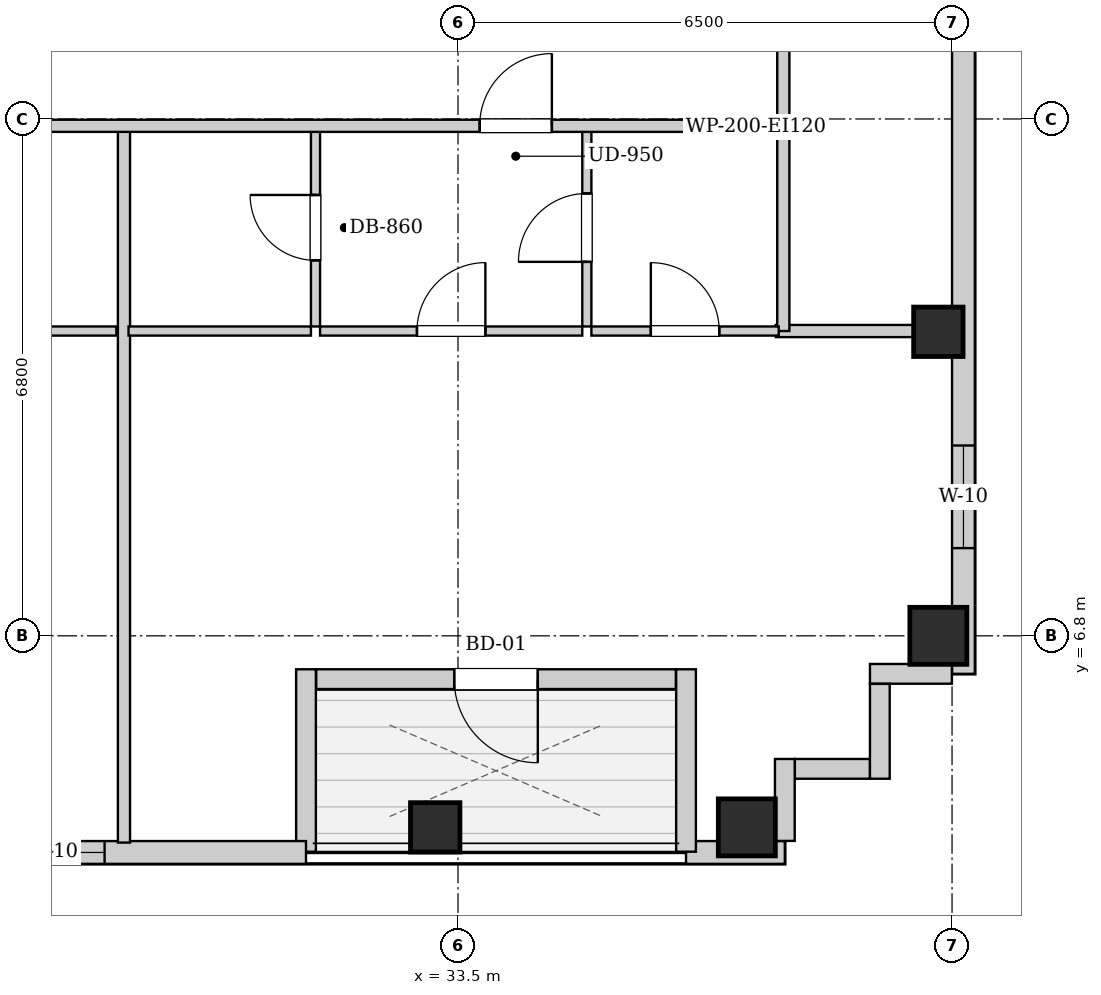
"""IFC4 building model, lengths in metres.
Left out: names, types, materials, properties, quantities, classifications, styles, units other than length and angle.
Written with IfcOpenShell. Run it as: python <this file> out.ifc"""

import sys

from ifc_helpers import new_model, si_unit, direction, frame, frame_2d, origin, origin_2d, place, context, subcontext, project, spatial, rectangle, extrude, element, fill, save


model = new_model("IFC4")
c1 = context("Model", 3, precision=1e-05, world=origin(), true_north=direction((0.0, 1.0)))
c2 = subcontext(c1, "Body", "Model", "MODEL_VIEW")
j1 = project(units=[si_unit("LENGTHUNIT", "METRE"), si_unit("PLANEANGLEUNIT", "RADIAN")], contexts=[c1])
p1 = place(None, origin())
s1 = spatial("IfcSite", under=j1, at=p1, CompositionType="ELEMENT")
p2 = place(p1, origin())
s2 = spatial("IfcBuilding", under=s1, at=p2, CompositionType="ELEMENT")
p3 = place(p2, frame((0.0, 0.0, 210.7)))
s3 = spatial("IfcBuildingStorey", under=s2, at=p3, CompositionType="ELEMENT", Elevation=210.7)
p4 = place(p3, frame((33.2, 4.28, 0.0), z_axis=(0.0, 0.0, 1.0), x_axis=(1.0, 0.0, 0.0)))
e1 = element("IfcColumn", 1, at=p4, inside=s3, PredefinedType="COLUMN", context=c2, shape_type="SweptSolid", body=[
    extrude(rectangle(XDim=0.65, YDim=0.65, at=origin_2d()), origin(), (0.0, 0.0, 1.0), 3.3),
])
for number, where, z_axis, x_axis in (
    (2, (37.3, 4.28, 0.0), (0.0, 0.0, 1.0), (1.0, 0.0, 0.0)),
    (3, (39.82, 6.8, 0.0), (0.0, 0.0, 1.0), (1.0, 0.0, 0.0)),
):
    element("IfcColumn", number, at=place(p3, frame(where, z_axis=z_axis, x_axis=x_axis)), inside=s3, PredefinedType="COLUMN", context=c2, shape_type="SweptSolid", body=[
        extrude(rectangle(XDim=0.75, YDim=0.75, at=origin_2d()), origin(), (0.0, 0.0, 1.0), 3.3),
    ])
p5 = place(p3, frame((39.82, 10.8, 0.0), z_axis=(0.0, 0.0, 1.0), x_axis=(1.0, 0.0, 0.0)))
e4 = element("IfcColumn", 4, at=p5, inside=s3, PredefinedType="COLUMN", context=c2, shape_type="SweptSolid", body=[
    extrude(rectangle(XDim=0.65, YDim=0.65, at=origin_2d()), origin(), (0.0, 0.0, 1.0), 3.3),
])
p6 = place(p3, frame((40.15, 37.7, 0.0), z_axis=(0.0, 0.0, 1.0), x_axis=(0.0, -1.0, 0.0)))
e5 = element("IfcWall", 5, at=p6, inside=s3, PredefinedType="SOLIDWALL", context=c2, shape_type="SweptSolid", body=[
    extrude(rectangle(XDim=31.4, YDim=0.3, at=frame_2d((15.7, 0.0))), origin(), (0.0, 0.0, 1.0), 3.04),
])
p7 = place(p6, frame((28.396, 0.0, 0.55)))
e6 = element("IfcOpeningElement", 6, at=p7, cuts=e5, PredefinedType="OPENING", context=c2, shape_type="SweptSolid", body=[
    extrude(rectangle(XDim=1.35, YDim=1.2, at=frame_2d((0.675, 0.6))), frame((0.0, 0.16, 0.0), z_axis=(0.0, -1.0, 0.0), x_axis=(1.0, 0.0, 0.0)), (0.0, 0.0, 1.0), 0.32),
])
p8 = place(p6, frame((1.653, 0.0, 0.55)))
e7 = element("IfcOpeningElement", 7, at=p8, cuts=e5, PredefinedType="OPENING", context=c2, shape_type="SweptSolid", body=[
    extrude(rectangle(XDim=1.35, YDim=1.2, at=frame_2d((0.675, 0.6))), frame((0.0, 0.16, 0.0), z_axis=(0.0, -1.0, 0.0), x_axis=(1.0, 0.0, 0.0)), (0.0, 0.0, 1.0), 0.32),
])
p9 = place(p6, frame((18.856, 0.0, 0.55)))
e8 = element("IfcOpeningElement", 8, at=p9, cuts=e5, PredefinedType="OPENING", context=c2, shape_type="SweptSolid", body=[
    extrude(rectangle(XDim=1.35, YDim=1.2, at=frame_2d((0.675, 0.6))), frame((0.0, 0.16, 0.0), z_axis=(0.0, -1.0, 0.0), x_axis=(1.0, 0.0, 0.0)), (0.0, 0.0, 1.0), 0.32),
])
p10 = place(p6, frame((20.466, 0.0, 0.55)))
e9 = element("IfcOpeningElement", 9, at=p10, cuts=e5, PredefinedType="OPENING", context=c2, shape_type="SweptSolid", body=[
    extrude(rectangle(XDim=1.35, YDim=1.2, at=frame_2d((0.675, 0.6))), frame((0.0, 0.16, 0.0), z_axis=(0.0, -1.0, 0.0), x_axis=(1.0, 0.0, 0.0)), (0.0, 0.0, 1.0), 0.32),
])
p11 = place(p6, frame((11.85, 0.0, 0.55)))
e10 = element("IfcOpeningElement", 10, at=p11, cuts=e5, PredefinedType="OPENING", context=c2, shape_type="SweptSolid", body=[
    extrude(rectangle(XDim=1.35, YDim=1.2, at=frame_2d((0.675, 0.6))), frame((0.0, 0.16, 0.0), z_axis=(0.0, -1.0, 0.0), x_axis=(1.0, 0.0, 0.0)), (0.0, 0.0, 1.0), 0.32),
])
p12 = place(p6, frame((9.185, 0.0, 0.55)))
e11 = element("IfcOpeningElement", 11, at=p12, cuts=e5, PredefinedType="OPENING", context=c2, shape_type="SweptSolid", body=[
    extrude(rectangle(XDim=1.35, YDim=1.2, at=frame_2d((0.675, 0.6))), frame((0.0, 0.16, 0.0), z_axis=(0.0, -1.0, 0.0), x_axis=(1.0, 0.0, 0.0)), (0.0, 0.0, 1.0), 0.32),
])
p13 = place(p3, frame((37.8, 3.95, 0.0), z_axis=(0.0, 0.0, 1.0), x_axis=(-1.0, 0.0, 0.0)))
e12 = element("IfcWall", 12, at=p13, inside=s3, PredefinedType="SOLIDWALL", context=c2, shape_type="SweptSolid", body=[
    extrude(rectangle(XDim=1.3, YDim=0.3, at=frame_2d((0.65, 0.0))), origin(), (0.0, 0.0, 1.0), 3.04),
])
p14 = place(p3, frame((36.5, 3.96, 0.0), z_axis=(0.0, 0.0, 1.0), x_axis=(0.0, 1.0, 0.0)))
e13 = element("IfcWall", 13, at=p14, inside=s3, PredefinedType="SOLIDWALL", context=c2, shape_type="SweptSolid", body=[
    extrude(rectangle(XDim=2.4, YDim=0.26, at=frame_2d((1.2, 0.0))), origin(), (0.0, 0.0, 1.0), 3.04),
])
p15 = place(p3, frame((36.366, 6.23, 0.0), z_axis=(0.0, 0.0, 1.0), x_axis=(-1.0, 0.0, 0.0)))
e14 = element("IfcWall", 14, at=p15, inside=s3, PredefinedType="SOLIDWALL", context=c2, shape_type="SweptSolid", body=[
    extrude(rectangle(XDim=4.732, YDim=0.26, at=frame_2d((2.366, 0.0))), origin(), (0.0, 0.0, 1.0), 3.04),
])
p16 = place(p15, frame((1.816, 0.0, 0.0)))
e15 = element("IfcOpeningElement", 15, at=p16, cuts=e14, PredefinedType="OPENING", context=c2, shape_type="SweptSolid", body=[
    extrude(rectangle(XDim=1.1, YDim=2.0, at=frame_2d((0.55, 1.0))), frame((0.0, 0.14, 0.0), z_axis=(0.0, -1.0, 0.0), x_axis=(1.0, 0.0, 0.0)), (0.0, 0.0, 1.0), 0.28),
])
p17 = place(p3, frame((31.5, 6.36, 0.0), z_axis=(0.0, 0.0, 1.0), x_axis=(0.0, -1.0, 0.0)))
e16 = element("IfcWall", 16, at=p17, inside=s3, PredefinedType="SOLIDWALL", context=c2, shape_type="SweptSolid", body=[
    extrude(rectangle(XDim=2.4, YDim=0.26, at=frame_2d((1.2, 0.0))), origin(), (0.0, 0.0, 1.0), 3.04),
])
p18 = place(p3, frame((31.5, 3.95, 0.0), z_axis=(0.0, 0.0, 1.0), x_axis=(-1.0, 0.0, 0.0)))
e17 = element("IfcWall", 17, at=p18, inside=s3, PredefinedType="SOLIDWALL", context=c2, shape_type="SweptSolid", body=[
    extrude(rectangle(XDim=10.65, YDim=0.3, at=frame_2d((5.325, 0.0))), origin(), (0.0, 0.0, 1.0), 3.04),
])
p19 = place(p18, frame((9.0, 0.0, 0.55)))
e18 = element("IfcOpeningElement", 18, at=p19, cuts=e17, PredefinedType="OPENING", context=c2, shape_type="SweptSolid", body=[
    extrude(rectangle(XDim=0.85, YDim=1.2, at=frame_2d((0.425, 0.6))), frame((0.0, 0.16, 0.0), z_axis=(0.0, -1.0, 0.0), x_axis=(1.0, 0.0, 0.0)), (0.0, 0.0, 1.0), 0.32),
])
p20 = place(p18, frame((2.65, 0.0, 0.55)))
e19 = element("IfcOpeningElement", 19, at=p20, cuts=e17, PredefinedType="OPENING", context=c2, shape_type="SweptSolid", body=[
    extrude(rectangle(XDim=1.35, YDim=1.2, at=frame_2d((0.675, 0.6))), frame((0.0, 0.16, 0.0), z_axis=(0.0, -1.0, 0.0), x_axis=(1.0, 0.0, 0.0)), (0.0, 0.0, 1.0), 0.32),
])
p21 = place(p3, frame((39.998, 6.3, 0.0), z_axis=(0.0, 0.0, 1.0), x_axis=(-1.0, 0.0, 0.0)))
e20 = element("IfcWall", 20, at=p21, inside=s3, PredefinedType="SOLIDWALL", context=c2, shape_type="SweptSolid", body=[
    extrude(rectangle(XDim=1.078, YDim=0.26, at=frame_2d((0.539, 0.0))), origin(), (0.0, 0.0, 1.0), 3.04),
])
p22 = place(p3, frame((39.05, 6.168, 0.0), z_axis=(0.0, 0.0, 1.0), x_axis=(0.0, -1.0, 0.0)))
e21 = element("IfcWall", 21, at=p22, inside=s3, PredefinedType="SOLIDWALL", context=c2, shape_type="SweptSolid", body=[
    extrude(rectangle(XDim=1.248, YDim=0.26, at=frame_2d((0.624, 0.0))), origin(), (0.0, 0.0, 1.0), 3.04),
])
p23 = place(p3, frame((38.918, 5.05, 0.0), z_axis=(0.0, 0.0, 1.0), x_axis=(-1.0, 0.0, 0.0)))
e22 = element("IfcWall", 22, at=p23, inside=s3, PredefinedType="SOLIDWALL", context=c2, shape_type="SweptSolid", body=[
    extrude(rectangle(XDim=0.986, YDim=0.26, at=frame_2d((0.493, 0.0))), origin(), (0.0, 0.0, 1.0), 3.04),
])
p24 = place(p3, frame((37.8, 5.18, 0.0), z_axis=(0.0, 0.0, 1.0), x_axis=(0.0, -1.0, 0.0)))
e23 = element("IfcWall", 23, at=p24, inside=s3, PredefinedType="SOLIDWALL", context=c2, shape_type="SweptSolid", body=[
    extrude(rectangle(XDim=1.078, YDim=0.26, at=frame_2d((0.539, 0.0))), origin(), (0.0, 0.0, 1.0), 3.04),
])
p25 = place(p3, frame((37.78, 13.51, 0.0), z_axis=(0.0, 0.0, 1.0), x_axis=(0.0, 1.0, 0.0)))
e24 = element("IfcWall", 24, at=p25, inside=s3, PredefinedType="PARTITIONING", context=c2, shape_type="SweptSolid", body=[
    extrude(rectangle(XDim=1.58, YDim=0.16, at=frame_2d((0.79, 0.0))), origin(), (0.0, 0.0, 1.0), 3.04),
])
p26 = place(p3, frame((25.25, 10.81, 0.0), z_axis=(0.0, 0.0, 1.0), x_axis=(1.0, 0.0, 0.0)))
e25 = element("IfcWall", 25, at=p26, inside=s3, PredefinedType="PARTITIONING", context=c2, shape_type="SweptSolid", body=[
    extrude(rectangle(XDim=3.755, YDim=0.12, at=frame_2d((1.877, 0.0))), origin(), (0.0, 0.0, 1.0), 3.04),
])
p27 = place(p26, frame((1.427, 0.0, 0.0)))
e26 = element("IfcOpeningElement", 26, at=p27, cuts=e25, PredefinedType="OPENING", context=c2, shape_type="SweptSolid", body=[
    extrude(rectangle(XDim=0.9, YDim=2.05, at=frame_2d((0.45, 1.025))), frame((0.0, 0.07, 0.0), z_axis=(0.0, -1.0, 0.0), x_axis=(1.0, 0.0, 0.0)), (0.0, 0.0, 1.0), 0.14),
])
p28 = place(p3, frame((37.68, 10.81, 0.0), z_axis=(0.0, 0.0, 1.0), x_axis=(1.0, 0.0, 0.0)))
e27 = element("IfcWall", 27, at=p28, inside=s3, PredefinedType="PARTITIONING", context=c2, shape_type="SweptSolid", body=[
    extrude(rectangle(XDim=2.34, YDim=0.16, at=frame_2d((1.17, 0.0))), origin(), (0.0, 0.0, 1.0), 3.04),
])
p29 = place(p3, frame((37.78, 10.81, 0.0), z_axis=(0.0, 0.0, 1.0), x_axis=(0.0, 1.0, 0.0)))
e28 = element("IfcWall", 28, at=p29, inside=s3, PredefinedType="PARTITIONING", context=c2, shape_type="SweptSolid", body=[
    extrude(rectangle(XDim=2.66, YDim=0.16, at=frame_2d((1.33, 0.0))), origin(), (0.0, 0.0, 1.0), 3.04),
])
p30 = place(p3, frame((29.105, 4.08, 0.0), z_axis=(0.0, 0.0, 1.0), x_axis=(0.0, 1.0, 0.0)))
e29 = element("IfcWall", 29, at=p30, inside=s3, PredefinedType="PARTITIONING", context=c2, shape_type="SweptSolid", body=[
    extrude(rectangle(XDim=9.39, YDim=0.16, at=frame_2d((4.695, 0.0))), origin(), (0.0, 0.0, 1.0), 3.04),
])
p31 = place(p3, frame((31.625, 10.87, 0.0), z_axis=(0.0, 0.0, 1.0), x_axis=(0.0, 1.0, 0.0)))
e30 = element("IfcWall", 30, at=p31, inside=s3, PredefinedType="PARTITIONING", context=c2, shape_type="SweptSolid", body=[
    extrude(rectangle(XDim=2.6, YDim=0.12, at=frame_2d((1.3, 0.0))), origin(), (0.0, 0.0, 1.0), 3.04),
])
p32 = place(p31, frame((0.87, 0.0, 0.0)))
e31 = element("IfcOpeningElement", 31, at=p32, cuts=e30, PredefinedType="OPENING", context=c2, shape_type="SweptSolid", body=[
    extrude(rectangle(XDim=0.86, YDim=2.05, at=frame_2d((0.43, 1.025))), frame((0.0, 0.07, 0.0), z_axis=(0.0, -1.0, 0.0), x_axis=(1.0, 0.0, 0.0)), (0.0, 0.0, 1.0), 0.14),
])
p33 = place(p3, frame((29.165, 10.81, 0.0), z_axis=(0.0, 0.0, 1.0), x_axis=(1.0, 0.0, 0.0)))
e32 = element("IfcWall", 32, at=p33, inside=s3, PredefinedType="PARTITIONING", context=c2, shape_type="SweptSolid", body=[
    extrude(rectangle(XDim=2.4, YDim=0.12, at=frame_2d((1.2, 0.0))), origin(), (0.0, 0.0, 1.0), 3.04),
])
p34 = place(p3, frame((35.195, 10.87, 0.0), z_axis=(0.0, 0.0, 1.0), x_axis=(0.0, 1.0, 0.0)))
e33 = element("IfcWall", 33, at=p34, inside=s3, PredefinedType="PARTITIONING", context=c2, shape_type="SweptSolid", body=[
    extrude(rectangle(XDim=2.6, YDim=0.12, at=frame_2d((1.3, 0.0))), origin(), (0.0, 0.0, 1.0), 3.04),
])
p35 = place(p34, frame((0.85, 0.0, 0.0)))
e34 = element("IfcOpeningElement", 34, at=p35, cuts=e33, PredefinedType="OPENING", context=c2, shape_type="SweptSolid", body=[
    extrude(rectangle(XDim=0.9, YDim=2.05, at=frame_2d((0.45, 1.025))), frame((0.0, 0.07, 0.0), z_axis=(0.0, -1.0, 0.0), x_axis=(1.0, 0.0, 0.0)), (0.0, 0.0, 1.0), 0.14),
])
p36 = place(p3, frame((31.685, 10.81, 0.0), z_axis=(0.0, 0.0, 1.0), x_axis=(1.0, 0.0, 0.0)))
e35 = element("IfcWall", 35, at=p36, inside=s3, PredefinedType="PARTITIONING", context=c2, shape_type="SweptSolid", body=[
    extrude(rectangle(XDim=3.45, YDim=0.12, at=frame_2d((1.725, 0.0))), origin(), (0.0, 0.0, 1.0), 3.04),
])
p37 = place(p36, frame((1.275, 0.0, 0.0)))
e36 = element("IfcOpeningElement", 36, at=p37, cuts=e35, PredefinedType="OPENING", context=c2, shape_type="SweptSolid", body=[
    extrude(rectangle(XDim=0.9, YDim=2.05, at=frame_2d((0.45, 1.025))), frame((0.0, 0.07, 0.0), z_axis=(0.0, -1.0, 0.0), x_axis=(1.0, 0.0, 0.0)), (0.0, 0.0, 1.0), 0.14),
])
p38 = place(p3, frame((35.255, 10.81, 0.0), z_axis=(0.0, 0.0, 1.0), x_axis=(1.0, 0.0, 0.0)))
e37 = element("IfcWall", 37, at=p38, inside=s3, PredefinedType="PARTITIONING", context=c2, shape_type="SweptSolid", body=[
    extrude(rectangle(XDim=2.465, YDim=0.12, at=frame_2d((1.232, 0.0))), origin(), (0.0, 0.0, 1.0), 3.04),
])
p39 = place(p38, frame((0.782, 0.0, 0.0)))
e38 = element("IfcOpeningElement", 38, at=p39, cuts=e37, PredefinedType="OPENING", context=c2, shape_type="SweptSolid", body=[
    extrude(rectangle(XDim=0.9, YDim=2.05, at=frame_2d((0.45, 1.025))), frame((0.0, 0.07, 0.0), z_axis=(0.0, -1.0, 0.0), x_axis=(1.0, 0.0, 0.0)), (0.0, 0.0, 1.0), 0.14),
])
p40 = place(p3, frame((13.15, 13.51, 0.0), z_axis=(0.0, 0.0, 1.0), x_axis=(1.0, 0.0, 0.0)))
e39 = element("IfcWall", 39, at=p40, inside=s3, PredefinedType="PARTITIONING", context=c2, shape_type="SweptSolid", body=[
    extrude(rectangle(XDim=24.6, YDim=0.16, at=frame_2d((12.3, 0.0))), origin(), (0.0, 0.0, 1.0), 3.04),
])
p41 = place(p40, frame((5.235, 0.0, 0.0)))
e40 = element("IfcOpeningElement", 40, at=p41, cuts=e39, PredefinedType="OPENING", context=c2, shape_type="SweptSolid", body=[
    extrude(rectangle(XDim=0.95, YDim=2.1, at=frame_2d((0.475, 1.05))), frame((0.0, 0.09, 0.0), z_axis=(0.0, -1.0, 0.0), x_axis=(1.0, 0.0, 0.0)), (0.0, 0.0, 1.0), 0.18),
])
p42 = place(p40, frame((13.503, 0.0, 0.0)))
e41 = element("IfcOpeningElement", 41, at=p42, cuts=e39, PredefinedType="OPENING", context=c2, shape_type="SweptSolid", body=[
    extrude(rectangle(XDim=0.95, YDim=2.1, at=frame_2d((0.475, 1.05))), frame((0.0, 0.09, 0.0), z_axis=(0.0, -1.0, 0.0), x_axis=(1.0, 0.0, 0.0)), (0.0, 0.0, 1.0), 0.18),
])
p43 = place(p40, frame((20.635, 0.0, 0.0)))
e42 = element("IfcOpeningElement", 42, at=p43, cuts=e39, PredefinedType="OPENING", context=c2, shape_type="SweptSolid", body=[
    extrude(rectangle(XDim=0.95, YDim=2.1, at=frame_2d((0.475, 1.05))), frame((0.0, 0.09, 0.0), z_axis=(0.0, -1.0, 0.0), x_axis=(1.0, 0.0, 0.0)), (0.0, 0.0, 1.0), 0.18),
])
p44 = place(p32, origin())
e43 = element("IfcDoor", 43, at=p44, inside=s3, OperationType="SINGLE_SWING_RIGHT", PredefinedType="DOOR", context=c2, shape_type="SweptSolid", body=[
    extrude(rectangle(XDim=0.86, YDim=2.05, at=frame_2d((0.43, 1.025))), frame((0.0, 0.025, 0.0), z_axis=(0.0, -1.0, 0.0), x_axis=(1.0, 0.0, 0.0)), (0.0, 0.0, 1.0), 0.05),
])
fill(e31, e43)
p45 = place(p35, origin())
e44 = element("IfcDoor", 44, at=p45, inside=s3, OperationType="SINGLE_SWING_LEFT", PredefinedType="DOOR", context=c2, shape_type="SweptSolid", body=[
    extrude(rectangle(XDim=0.9, YDim=2.05, at=frame_2d((0.45, 1.025))), frame((0.0, 0.025, 0.0), z_axis=(0.0, -1.0, 0.0), x_axis=(1.0, 0.0, 0.0)), (0.0, 0.0, 1.0), 0.05),
])
fill(e34, e44)
p46 = place(p37, origin())
e45 = element("IfcDoor", 45, at=p46, inside=s3, OperationType="SINGLE_SWING_RIGHT", PredefinedType="DOOR", context=c2, shape_type="SweptSolid", body=[
    extrude(rectangle(XDim=0.9, YDim=2.05, at=frame_2d((0.45, 1.025))), frame((0.0, 0.025, 0.0), z_axis=(0.0, -1.0, 0.0), x_axis=(1.0, 0.0, 0.0)), (0.0, 0.0, 1.0), 0.05),
])
fill(e36, e45)
p47 = place(p39, origin())
e46 = element("IfcDoor", 46, at=p47, inside=s3, OperationType="SINGLE_SWING_LEFT", PredefinedType="DOOR", context=c2, shape_type="SweptSolid", body=[
    extrude(rectangle(XDim=0.9, YDim=2.05, at=frame_2d((0.45, 1.025))), frame((0.0, 0.025, 0.0), z_axis=(0.0, -1.0, 0.0), x_axis=(1.0, 0.0, 0.0)), (0.0, 0.0, 1.0), 0.05),
])
fill(e38, e46)
p48 = place(p43, origin())
e47 = element("IfcDoor", 47, at=p48, inside=s3, OperationType="SINGLE_SWING_RIGHT", PredefinedType="DOOR", context=c2, shape_type="SweptSolid", body=[
    extrude(rectangle(XDim=0.95, YDim=2.1, at=frame_2d((0.475, 1.05))), frame((0.0, 0.025, 0.0), z_axis=(0.0, -1.0, 0.0), x_axis=(1.0, 0.0, 0.0)), (0.0, 0.0, 1.0), 0.05),
])
fill(e42, e47)
p49 = place(p16, origin())
e48 = element("IfcDoor", 48, at=p49, inside=s3, OperationType="SINGLE_SWING_LEFT", PredefinedType="DOOR", context=c2, shape_type="SweptSolid", body=[
    extrude(rectangle(XDim=1.1, YDim=2.0, at=frame_2d((0.55, 1.0))), frame((0.0, 0.025, 0.0), z_axis=(0.0, -1.0, 0.0), x_axis=(1.0, 0.0, 0.0)), (0.0, 0.0, 1.0), 0.05),
])
fill(e15, e48)
p50 = place(p20, origin())
e49 = element("IfcWindow", 49, at=p50, inside=s3, PartitioningType="SINGLE_PANEL", PredefinedType="WINDOW", context=c2, shape_type="SweptSolid", body=[
    extrude(rectangle(XDim=1.35, YDim=1.2, at=frame_2d((0.675, 0.6))), frame((0.0, 0.03, 0.0), z_axis=(0.0, -1.0, 0.0), x_axis=(1.0, 0.0, 0.0)), (0.0, 0.0, 1.0), 0.06),
])
fill(e19, e49)
p51 = place(p7, origin())
e50 = element("IfcWindow", 50, at=p51, inside=s3, PartitioningType="SINGLE_PANEL", PredefinedType="WINDOW", context=c2, shape_type="SweptSolid", body=[
    extrude(rectangle(XDim=1.35, YDim=1.2, at=frame_2d((0.675, 0.6))), frame((0.0, 0.03, 0.0), z_axis=(0.0, -1.0, 0.0), x_axis=(1.0, 0.0, 0.0)), (0.0, 0.0, 1.0), 0.06),
])
fill(e6, e50)
save(model, sys.argv[1])
